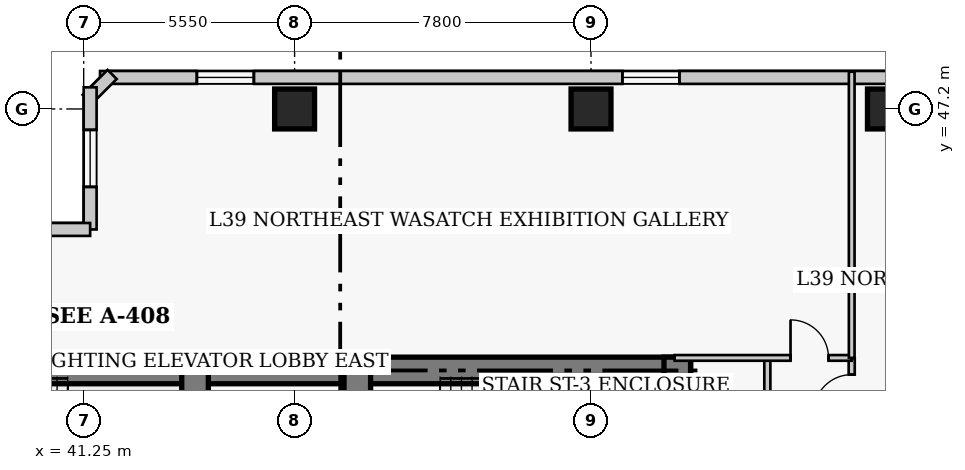
"""IFC4 building model, lengths in metres.
Left out: names, types, materials, properties, quantities, classifications, styles, units other than length and angle.
Written with IfcOpenShell. Run it as: python <this file> out.ifc"""

import sys

from ifc_helpers import new_model, si_unit, direction, frame, frame_2d, origin, origin_2d, place, context, subcontext, project, spatial, rectangle, extrude, element, fill, save


model = new_model("IFC4")
c1 = context("Model", 3, precision=1e-05, world=origin(), true_north=direction((0.0, 1.0)))
c2 = subcontext(c1, "Body", "Model", "MODEL_VIEW")
j1 = project(units=[si_unit("LENGTHUNIT", "METRE"), si_unit("PLANEANGLEUNIT", "RADIAN")], contexts=[c1])
p1 = place(None, origin())
s1 = spatial("IfcSite", under=j1, at=p1, CompositionType="ELEMENT")
p2 = place(p1, origin())
s2 = spatial("IfcBuilding", under=s1, at=p2, CompositionType="ELEMENT")
p3 = place(p2, frame((0.0, 0.0, 157.4)))
s3 = spatial("IfcBuildingStorey", under=s2, at=p3, CompositionType="ELEMENT", Elevation=157.4)
p4 = place(p3, frame((35.85, 40.32, 0.0), z_axis=(0.0, 0.0, 1.0), x_axis=(1.0, 0.0, 0.0)))
e1 = element("IfcWall", 1, at=p4, inside=s3, PredefinedType="SHEAR", context=c2, shape_type="SweptSolid", body=[
    extrude(rectangle(XDim=12.6, YDim=0.7, at=frame_2d((6.3, 0.0))), origin(), (0.0, 0.0, 1.0), 3.8),
])
p5 = place(p3, frame((48.45, 40.32, 0.0), z_axis=(0.0, 0.0, 1.0), x_axis=(1.0, 0.0, 0.0)))
e2 = element("IfcWall", 2, at=p5, inside=s3, PredefinedType="SHEAR", context=c2, shape_type="SweptSolid", body=[
    extrude(rectangle(XDim=8.77, YDim=0.7, at=frame_2d((4.385, 0.0))), origin(), (0.0, 0.0, 1.0), 3.8),
])
p6 = place(p3, frame((56.87, 27.05, 0.0), z_axis=(0.0, 0.0, 1.0), x_axis=(0.0, 1.0, 0.0)))
e3 = element("IfcWall", 3, at=p6, inside=s3, PredefinedType="SHEAR", context=c2, shape_type="SweptSolid", body=[
    extrude(rectangle(XDim=13.62, YDim=0.7, at=frame_2d((6.81, 0.0))), origin(), (0.0, 0.0, 1.0), 3.8),
])
p7 = place(p3, frame((44.18, 36.37, 0.0), z_axis=(0.0, 0.0, 1.0), x_axis=(0.0, 1.0, 0.0)))
e4 = element("IfcWall", 4, at=p7, inside=s3, PredefinedType="SHEAR", context=c2, shape_type="SweptSolid", body=[
    extrude(rectangle(XDim=3.95, YDim=0.7, at=frame_2d((1.975, 0.0))), origin(), (0.0, 0.0, 1.0), 3.8),
])
p8 = place(p3, frame((48.45, 32.4, 0.0), z_axis=(0.0, 0.0, 1.0), x_axis=(0.0, 1.0, 0.0)))
e5 = element("IfcWall", 5, at=p8, inside=s3, PredefinedType="SHEAR", context=c2, shape_type="SweptSolid", body=[
    extrude(rectangle(XDim=7.92, YDim=0.7, at=frame_2d((3.96, 0.0))), origin(), (0.0, 0.0, 1.0), 3.8),
])
p9 = place(p8, frame((5.8, 0.0, 0.0)))
e6 = element("IfcOpeningElement", 6, at=p9, cuts=e5, PredefinedType="OPENING", context=c2, shape_type="SweptSolid", body=[
    extrude(rectangle(XDim=1.1, YDim=2.15, at=frame_2d((0.55, 1.075))), frame((0.0, 0.36, 0.0), z_axis=(0.0, -1.0, 0.0), x_axis=(1.0, 0.0, 0.0)), (0.0, 0.0, 1.0), 0.72),
])
for number, where, z_axis, x_axis in (
    (7, (46.8, 47.2, 0.0), (0.0, 0.0, 1.0), (1.0, 0.0, 0.0)),
    (8, (54.6, 47.2, 0.0), (0.0, 0.0, 1.0), (1.0, 0.0, 0.0)),
    (9, (62.4, 47.2, 0.0), (0.0, 0.0, 1.0), (1.0, 0.0, 0.0)),
):
    element("IfcColumn", number, at=place(p3, frame(where, z_axis=z_axis, x_axis=x_axis)), inside=s3, PredefinedType="COLUMN", context=c2, shape_type="SweptSolid", body=[
        extrude(rectangle(XDim=1.05, YDim=1.05, at=origin_2d()), origin(), (0.0, 0.0, 1.0), 3.8),
    ])
p10 = place(p3, frame((68.37, 48.03, 0.0), z_axis=(0.0, 0.0, 1.0), x_axis=(-1.0, 0.0, 0.0)))
e10 = element("IfcWall", 10, at=p10, inside=s3, PredefinedType="SOLIDWALL", context=c2, shape_type="SweptSolid", body=[
    extrude(rectangle(XDim=26.69, YDim=0.34, at=frame_2d((13.345, 0.0))), origin(), (0.0, 0.0, 1.0), 3.55),
])
p11 = place(p10, frame((3.048, 0.0, 0.85)))
e11 = element("IfcOpeningElement", 11, at=p11, cuts=e10, PredefinedType="OPENING", context=c2, shape_type="SweptSolid", body=[
    extrude(rectangle(XDim=1.5, YDim=1.75, at=frame_2d((0.75, 0.875))), frame((0.0, 0.18, 0.0), z_axis=(0.0, -1.0, 0.0), x_axis=(1.0, 0.0, 0.0)), (0.0, 0.0, 1.0), 0.36),
])
p12 = place(p10, frame((11.445, 0.0, 0.85)))
e12 = element("IfcOpeningElement", 12, at=p12, cuts=e10, PredefinedType="OPENING", context=c2, shape_type="SweptSolid", body=[
    extrude(rectangle(XDim=1.5, YDim=1.75, at=frame_2d((0.75, 0.875))), frame((0.0, 0.18, 0.0), z_axis=(0.0, -1.0, 0.0), x_axis=(1.0, 0.0, 0.0)), (0.0, 0.0, 1.0), 0.36),
])
p13 = place(p10, frame((22.642, 0.0, 0.85)))
e13 = element("IfcOpeningElement", 13, at=p13, cuts=e10, PredefinedType="OPENING", context=c2, shape_type="SweptSolid", body=[
    extrude(rectangle(XDim=1.5, YDim=1.75, at=frame_2d((0.75, 0.875))), frame((0.0, 0.18, 0.0), z_axis=(0.0, -1.0, 0.0), x_axis=(1.0, 0.0, 0.0)), (0.0, 0.0, 1.0), 0.36),
])
p14 = place(p3, frame((41.999, 48.108, 0.0), z_axis=(0.0, 0.0, 1.0), x_axis=(-0.707106781187, -0.707106781187, 0.0)))
e14 = element("IfcWall", 14, at=p14, inside=s3, PredefinedType="SOLIDWALL", context=c2, shape_type="SweptSolid", body=[
    extrude(rectangle(XDim=0.929, YDim=0.34, at=frame_2d((0.464, 0.0))), origin(), (0.0, 0.0, 1.0), 3.55),
])
p15 = place(p3, frame((41.42, 47.77, 0.0), z_axis=(0.0, 0.0, 1.0), x_axis=(0.0, -1.0, 0.0)))
e15 = element("IfcWall", 15, at=p15, inside=s3, PredefinedType="SOLIDWALL", context=c2, shape_type="SweptSolid", body=[
    extrude(rectangle(XDim=3.74, YDim=0.34, at=frame_2d((1.87, 0.0))), origin(), (0.0, 0.0, 1.0), 3.55),
])
p16 = place(p15, frame((1.12, 0.0, 0.85)))
e16 = element("IfcOpeningElement", 16, at=p16, cuts=e15, PredefinedType="OPENING", context=c2, shape_type="SweptSolid", body=[
    extrude(rectangle(XDim=1.5, YDim=1.75, at=frame_2d((0.75, 0.875))), frame((0.0, 0.18, 0.0), z_axis=(0.0, -1.0, 0.0), x_axis=(1.0, 0.0, 0.0)), (0.0, 0.0, 1.0), 0.36),
])
p17 = place(p3, frame((41.42, 44.03, 0.0), z_axis=(0.0, 0.0, 1.0), x_axis=(-1.0, 0.0, 0.0)))
e17 = element("IfcWall", 17, at=p17, inside=s3, PredefinedType="SOLIDWALL", context=c2, shape_type="SweptSolid", body=[
    extrude(rectangle(XDim=4.84, YDim=0.34, at=frame_2d((2.42, 0.0))), origin(), (0.0, 0.0, 1.0), 3.55),
])
p18 = place(p17, frame((1.67, 0.0, 0.85)))
e18 = element("IfcOpeningElement", 18, at=p18, cuts=e17, PredefinedType="OPENING", context=c2, shape_type="SweptSolid", body=[
    extrude(rectangle(XDim=1.5, YDim=1.75, at=frame_2d((0.75, 0.875))), frame((0.0, 0.18, 0.0), z_axis=(0.0, -1.0, 0.0), x_axis=(1.0, 0.0, 0.0)), (0.0, 0.0, 1.0), 0.36),
])
p19 = place(p3, frame((61.46, 12.05, 0.0), z_axis=(0.0, 0.0, 1.0), x_axis=(0.0, 1.0, 0.0)))
e19 = element("IfcWall", 19, at=p19, inside=s3, PredefinedType="PARTITIONING", context=c2, shape_type="SweptSolid", body=[
    extrude(rectangle(XDim=28.6, YDim=0.16, at=frame_2d((14.3, 0.0))), origin(), (0.0, 0.0, 1.0), 3.55),
])
p20 = place(p19, frame((0.925, 0.0, 0.0)))
e20 = element("IfcOpeningElement", 20, at=p20, cuts=e19, PredefinedType="OPENING", context=c2, shape_type="SweptSolid", body=[
    extrude(rectangle(XDim=0.95, YDim=2.1, at=frame_2d((0.475, 1.05))), frame((0.0, 0.09, 0.0), z_axis=(0.0, -1.0, 0.0), x_axis=(1.0, 0.0, 0.0)), (0.0, 0.0, 1.0), 0.18),
])
p21 = place(p19, frame((20.325, 0.0, 0.0)))
e21 = element("IfcOpeningElement", 21, at=p21, cuts=e19, PredefinedType="OPENING", context=c2, shape_type="SweptSolid", body=[
    extrude(rectangle(XDim=0.95, YDim=2.1, at=frame_2d((0.475, 1.05))), frame((0.0, 0.09, 0.0), z_axis=(0.0, -1.0, 0.0), x_axis=(1.0, 0.0, 0.0)), (0.0, 0.0, 1.0), 0.18),
])
p22 = place(p19, frame((27.16, 0.0, 0.0)))
e22 = element("IfcOpeningElement", 22, at=p22, cuts=e19, PredefinedType="OPENING", context=c2, shape_type="SweptSolid", body=[
    extrude(rectangle(XDim=1.0, YDim=2.15, at=frame_2d((0.5, 1.075))), frame((0.0, 0.09, 0.0), z_axis=(0.0, -1.0, 0.0), x_axis=(1.0, 0.0, 0.0)), (0.0, 0.0, 1.0), 0.18),
])
p23 = place(p3, frame((59.24, 17.96, 0.0), z_axis=(0.0, 0.0, 1.0), x_axis=(0.0, 1.0, 0.0)))
e23 = element("IfcWall", 23, at=p23, inside=s3, PredefinedType="PARTITIONING", context=c2, shape_type="SweptSolid", body=[
    extrude(rectangle(XDim=22.69, YDim=0.16, at=frame_2d((11.345, 0.0))), origin(), (0.0, 0.0, 1.0), 3.55),
])
p24 = place(p3, frame((56.8, 40.65, 0.0), z_axis=(0.0, 0.0, 1.0), x_axis=(1.0, 0.0, 0.0)))
e24 = element("IfcWall", 24, at=p24, inside=s3, PredefinedType="PARTITIONING", context=c2, shape_type="SweptSolid", body=[
    extrude(rectangle(XDim=4.66, YDim=0.15, at=frame_2d((2.33, 0.0))), origin(), (0.0, 0.0, 1.0), 3.55),
])
p25 = place(p24, frame((3.05, 0.0, 0.0)))
e25 = element("IfcOpeningElement", 25, at=p25, cuts=e24, PredefinedType="OPENING", context=c2, shape_type="SweptSolid", body=[
    extrude(rectangle(XDim=1.0, YDim=2.15, at=frame_2d((0.5, 1.075))), frame((0.0, 0.085, 0.0), z_axis=(0.0, -1.0, 0.0), x_axis=(1.0, 0.0, 0.0)), (0.0, 0.0, 1.0), 0.17),
])
p26 = place(p3, frame((61.46, 40.65, 0.0), z_axis=(0.0, 0.0, 1.0), x_axis=(0.0, 1.0, 0.0)))
e26 = element("IfcWall", 26, at=p26, inside=s3, PredefinedType="PARTITIONING", context=c2, shape_type="SweptSolid", body=[
    extrude(rectangle(XDim=7.53, YDim=0.15, at=frame_2d((3.765, 0.0))), origin(), (0.0, 0.0, 1.0), 3.55),
])
p27 = place(p12, origin())
e27 = element("IfcWindow", 27, at=p27, inside=s3, PartitioningType="SINGLE_PANEL", PredefinedType="WINDOW", context=c2, shape_type="SweptSolid", body=[
    extrude(rectangle(XDim=1.5, YDim=1.75, at=frame_2d((0.75, 0.875))), frame((0.0, 0.03, 0.0), z_axis=(0.0, -1.0, 0.0), x_axis=(1.0, 0.0, 0.0)), (0.0, 0.0, 1.0), 0.06),
])
fill(e12, e27)
p28 = place(p13, origin())
e28 = element("IfcWindow", 28, at=p28, inside=s3, PartitioningType="SINGLE_PANEL", PredefinedType="WINDOW", context=c2, shape_type="SweptSolid", body=[
    extrude(rectangle(XDim=1.5, YDim=1.75, at=frame_2d((0.75, 0.875))), frame((0.0, 0.03, 0.0), z_axis=(0.0, -1.0, 0.0), x_axis=(1.0, 0.0, 0.0)), (0.0, 0.0, 1.0), 0.06),
])
fill(e13, e28)
p29 = place(p16, origin())
e29 = element("IfcWindow", 29, at=p29, inside=s3, PartitioningType="SINGLE_PANEL", PredefinedType="WINDOW", context=c2, shape_type="SweptSolid", body=[
    extrude(rectangle(XDim=1.5, YDim=1.75, at=frame_2d((0.75, 0.875))), frame((0.0, 0.03, 0.0), z_axis=(0.0, -1.0, 0.0), x_axis=(1.0, 0.0, 0.0)), (0.0, 0.0, 1.0), 0.06),
])
fill(e16, e29)
p30 = place(p25, origin())
e30 = element("IfcDoor", 30, at=p30, inside=s3, OperationType="SINGLE_SWING_LEFT", PredefinedType="DOOR", context=c2, shape_type="SweptSolid", body=[
    extrude(rectangle(XDim=1.0, YDim=2.15, at=frame_2d((0.5, 1.075))), frame((0.0, 0.025, 0.0), z_axis=(0.0, -1.0, 0.0), x_axis=(1.0, 0.0, 0.0)), (0.0, 0.0, 1.0), 0.05),
])
fill(e25, e30)
p31 = place(p22, origin())
e31 = element("IfcDoor", 31, at=p31, inside=s3, OperationType="SINGLE_SWING_LEFT", PredefinedType="DOOR", context=c2, shape_type="SweptSolid", body=[
    extrude(rectangle(XDim=1.0, YDim=2.15, at=frame_2d((0.5, 1.075))), frame((0.0, 0.025, 0.0), z_axis=(0.0, -1.0, 0.0), x_axis=(1.0, 0.0, 0.0)), (0.0, 0.0, 1.0), 0.05),
])
fill(e22, e31)
save(model, sys.argv[1])
